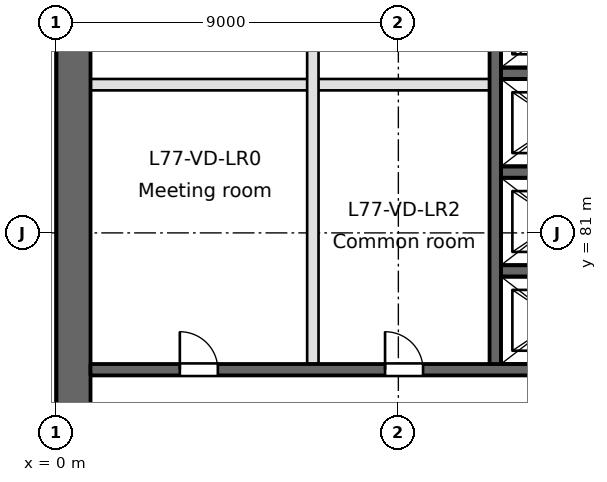
"""IFC4 building model, lengths in metres.
Left out: names, types, materials, properties, quantities, classifications, styles, units other than length and angle.
Written with IfcOpenShell. Run it as: python <this file> out.ifc"""

import sys

from ifc_helpers import new_model, si_unit, direction, frame, frame_2d, origin, place, context, subcontext, project, spatial, rectangle, extrude, element, fill, save


model = new_model("IFC4")
c1 = context("Model", 3, precision=1e-05, world=origin(), true_north=direction((0.0, 1.0)))
c2 = subcontext(c1, "Body", "Model", "MODEL_VIEW")
j1 = project(units=[si_unit("LENGTHUNIT", "METRE"), si_unit("PLANEANGLEUNIT", "RADIAN")], contexts=[c1])
p1 = place(None, origin())
s1 = spatial("IfcSite", under=j1, at=p1, CompositionType="ELEMENT")
p2 = place(p1, origin())
s2 = spatial("IfcBuilding", under=s1, at=p2, CompositionType="ELEMENT")
p3 = place(p2, frame((0.0, 0.0, 299.3)))
s3 = spatial("IfcBuildingStorey", under=s2, at=p3, CompositionType="ELEMENT", Elevation=299.3)
p4 = place(p3, frame((0.45, 94.5, 0.0), z_axis=(0.0, 0.0, 1.0), x_axis=(0.0, -1.0, 0.0)))
e1 = element("IfcWall", 1, at=p4, inside=s3, PredefinedType="SHEAR", context=c2, shape_type="SweptSolid", body=[
    extrude(rectangle(XDim=40.456, YDim=0.9, at=frame_2d((20.228, 0.0))), origin(), (0.0, 0.0, 1.0), 3.7),
])
p5 = place(p3, frame((0.9, 77.4, -0.4), z_axis=(0.0, 0.0, 1.0), x_axis=(1.0, 0.0, 0.0)))
e2 = element("IfcWall", 2, at=p5, inside=s3, PredefinedType="SOLIDWALL", context=c2, shape_type="SweptSolid", body=[
    extrude(rectangle(XDim=21.45, YDim=0.3, at=frame_2d((10.725, 0.0))), origin(), (0.0, 0.0, 1.0), 3.65),
])
p6 = place(p5, frame((15.15, 0.0, 0.4)))
e3 = element("IfcOpeningElement", 3, at=p6, cuts=e2, PredefinedType="OPENING", context=c2, shape_type="SweptSolid", body=[
    extrude(rectangle(XDim=1.8, YDim=2.1, at=frame_2d((0.9, 1.05))), frame((0.0, 0.15, 0.0), z_axis=(0.0, -1.0, 0.0), x_axis=(1.0, 0.0, 0.0)), (0.0, 0.0, 1.0), 0.3),
])
p7 = place(p5, frame((2.35, 0.0, 0.4)))
e4 = element("IfcOpeningElement", 4, at=p7, cuts=e2, PredefinedType="OPENING", context=c2, shape_type="SweptSolid", body=[
    extrude(rectangle(XDim=1.0, YDim=2.1, at=frame_2d((0.5, 1.05))), frame((0.0, 0.15, 0.0), z_axis=(0.0, -1.0, 0.0), x_axis=(1.0, 0.0, 0.0)), (0.0, 0.0, 1.0), 0.3),
])
p8 = place(p5, frame((7.75, 0.0, 0.4)))
e5 = element("IfcOpeningElement", 5, at=p8, cuts=e2, PredefinedType="OPENING", context=c2, shape_type="SweptSolid", body=[
    extrude(rectangle(XDim=1.0, YDim=2.1, at=frame_2d((0.5, 1.05))), frame((0.0, 0.15, 0.0), z_axis=(0.0, -1.0, 0.0), x_axis=(1.0, 0.0, 0.0)), (0.0, 0.0, 1.0), 0.3),
])
for number, where, z_axis, x_axis in (
    (6, (11.7, 80.0, -0.4), (0.0, 0.0, 1.0), (1.0, 0.0, 0.0)),
    (7, (11.7, 82.6, -0.4), (0.0, 0.0, 1.0), (1.0, 0.0, 0.0)),
):
    element("IfcWall", number, at=place(p3, frame(where, z_axis=z_axis, x_axis=x_axis)), inside=s3, PredefinedType="SOLIDWALL", context=c2, shape_type="SweptSolid", body=[
        extrude(rectangle(XDim=3.0, YDim=0.3, at=frame_2d((1.5, 0.0))), origin(), (0.0, 0.0, 1.0), 3.65),
    ])
p9 = place(p3, frame((0.9, 84.9, 0.0), z_axis=(0.0, 0.0, 1.0), x_axis=(1.0, 0.0, 0.0)))
e8 = element("IfcWall", 8, at=p9, inside=s3, PredefinedType="PARTITIONING", context=c2, shape_type="SweptSolid", body=[
    extrude(rectangle(XDim=10.5, YDim=0.3, at=frame_2d((5.25, 0.0))), origin(), (0.0, 0.0, 1.0), 3.25),
])
p10 = place(p3, frame((11.7, 85.2, -0.4), z_axis=(0.0, 0.0, 1.0), x_axis=(1.0, 0.0, 0.0)))
e9 = element("IfcWall", 9, at=p10, inside=s3, PredefinedType="SOLIDWALL", context=c2, shape_type="SweptSolid", body=[
    extrude(rectangle(XDim=3.0, YDim=0.3, at=frame_2d((1.5, 0.0))), origin(), (0.0, 0.0, 1.0), 3.65),
])
p11 = place(p3, frame((6.75, 77.55, 0.0), z_axis=(0.0, 0.0, 1.0), x_axis=(0.0, 1.0, 0.0)))
e10 = element("IfcWall", 10, at=p11, inside=s3, PredefinedType="PARTITIONING", context=c2, shape_type="SweptSolid", body=[
    extrude(rectangle(XDim=12.95, YDim=0.3, at=frame_2d((6.475, 0.0))), origin(), (0.0, 0.0, 1.0), 3.25),
])
p12 = place(p3, frame((11.55, 77.55, -0.4), z_axis=(0.0, 0.0, 1.0), x_axis=(0.0, 1.0, 0.0)))
e11 = element("IfcWall", 11, at=p12, inside=s3, PredefinedType="SOLIDWALL", context=c2, shape_type="SweptSolid", body=[
    extrude(rectangle(XDim=10.1, YDim=0.3, at=frame_2d((5.05, 0.0))), origin(), (0.0, 0.0, 1.0), 3.65),
])
p13 = place(p7, origin())
e12 = element("IfcDoor", 12, at=p13, inside=s3, OperationType="SINGLE_SWING_LEFT", PredefinedType="DOOR", context=c2, shape_type="SweptSolid", body=[
    extrude(rectangle(XDim=1.0, YDim=2.1, at=frame_2d((0.5, 1.05))), frame((0.0, 0.025, 0.0), z_axis=(0.0, -1.0, 0.0), x_axis=(1.0, 0.0, 0.0)), (0.0, 0.0, 1.0), 0.05),
])
fill(e4, e12)
p14 = place(p8, origin())
e13 = element("IfcDoor", 13, at=p14, inside=s3, OperationType="SINGLE_SWING_LEFT", PredefinedType="DOOR", context=c2, shape_type="SweptSolid", body=[
    extrude(rectangle(XDim=1.0, YDim=2.1, at=frame_2d((0.5, 1.05))), frame((0.0, 0.025, 0.0), z_axis=(0.0, -1.0, 0.0), x_axis=(1.0, 0.0, 0.0)), (0.0, 0.0, 1.0), 0.05),
])
fill(e5, e13)
save(model, sys.argv[1])
